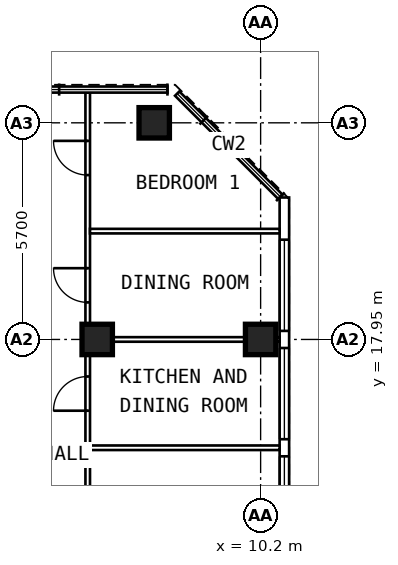
"""IFC4 building model, lengths in metres.
Left out: names, types, materials, properties, quantities, classifications, styles, units other than length and angle.
Written with IfcOpenShell. Run it as: python <this file> out.ifc"""

import sys

from ifc_helpers import new_model, si_unit, direction, frame, frame_2d, origin, origin_2d, place, context, subcontext, project, spatial, rectangle, extrude, element, fill, save


model = new_model("IFC4")
c1 = context("Model", 3, precision=1e-05, world=origin(), true_north=direction((0.0, 1.0)))
c2 = subcontext(c1, "Body", "Model", "MODEL_VIEW")
j1 = project(units=[si_unit("LENGTHUNIT", "METRE"), si_unit("PLANEANGLEUNIT", "RADIAN")], contexts=[c1])
p1 = place(None, origin())
s1 = spatial("IfcSite", under=j1, at=p1, CompositionType="ELEMENT")
p2 = place(p1, origin())
s2 = spatial("IfcBuilding", under=s1, at=p2, CompositionType="ELEMENT")
p3 = place(p2, frame((0.0, 0.0, 274.6)))
s3 = spatial("IfcBuildingStorey", under=s2, at=p3, CompositionType="ELEMENT", Elevation=274.6)
for number, where, z_axis, x_axis in (
    (1, (10.2, 17.95, 0.0), (0.0, 0.0, 1.0), (0.0, 1.0, 0.0)),
    (2, (7.4, 23.65, 0.0), (0.0, 0.0, 1.0), (0.0, 1.0, 0.0)),
    (3, (5.9, 17.95, 0.0), (0.0, 0.0, 1.0), (0.0, 1.0, 0.0)),
):
    element("IfcColumn", number, at=place(p3, frame(where, z_axis=z_axis, x_axis=x_axis)), inside=s3, PredefinedType="COLUMN", context=c2, shape_type="SweptSolid", body=[
        extrude(rectangle(XDim=0.8, YDim=0.8, at=origin_2d()), origin(), (0.0, 0.0, 1.0), 3.6),
    ])
p4 = place(p3, frame((10.825, 6.409, 0.0), z_axis=(0.0, 0.0, 1.0), x_axis=(0.0, 1.0, 0.0)))
e4 = element("IfcWall", 4, at=p4, inside=s3, PredefinedType="SOLIDWALL", context=c2, shape_type="SweptSolid", body=[
    extrude(rectangle(XDim=15.276, YDim=0.25, at=frame_2d((7.638, 0.0))), origin(), (0.0, 0.0, 1.0), 3.35),
])
p5 = place(p4, frame((0.366, 0.0, 0.6)))
e5 = element("IfcOpeningElement", 5, at=p5, cuts=e4, PredefinedType="OPENING", context=c2, shape_type="SweptSolid", body=[
    extrude(rectangle(XDim=2.4, YDim=2.0, at=frame_2d((1.2, 1.0))), frame((0.0, 0.137, 0.0), z_axis=(0.0, -1.0, 0.0), x_axis=(1.0, 0.0, 0.0)), (0.0, 0.0, 1.0), 0.274),
])
p6 = place(p4, frame((3.216, 0.0, 0.6)))
e6 = element("IfcOpeningElement", 6, at=p6, cuts=e4, PredefinedType="OPENING", context=c2, shape_type="SweptSolid", body=[
    extrude(rectangle(XDim=2.4, YDim=2.0, at=frame_2d((1.2, 1.0))), frame((0.0, 0.137, 0.0), z_axis=(0.0, -1.0, 0.0), x_axis=(1.0, 0.0, 0.0)), (0.0, 0.0, 1.0), 0.274),
])
p7 = place(p4, frame((6.066, 0.0, 0.6)))
e7 = element("IfcOpeningElement", 7, at=p7, cuts=e4, PredefinedType="OPENING", context=c2, shape_type="SweptSolid", body=[
    extrude(rectangle(XDim=2.4, YDim=2.0, at=frame_2d((1.2, 1.0))), frame((0.0, 0.137, 0.0), z_axis=(0.0, -1.0, 0.0), x_axis=(1.0, 0.0, 0.0)), (0.0, 0.0, 1.0), 0.274),
])
p8 = place(p4, frame((8.916, 0.0, 0.6)))
e8 = element("IfcOpeningElement", 8, at=p8, cuts=e4, PredefinedType="OPENING", context=c2, shape_type="SweptSolid", body=[
    extrude(rectangle(XDim=2.4, YDim=2.0, at=frame_2d((1.2, 1.0))), frame((0.0, 0.137, 0.0), z_axis=(0.0, -1.0, 0.0), x_axis=(1.0, 0.0, 0.0)), (0.0, 0.0, 1.0), 0.274),
])
p9 = place(p4, frame((11.766, 0.0, 0.6)))
e9 = element("IfcOpeningElement", 9, at=p9, cuts=e4, PredefinedType="OPENING", context=c2, shape_type="SweptSolid", body=[
    extrude(rectangle(XDim=2.4, YDim=2.0, at=frame_2d((1.2, 1.0))), frame((0.0, 0.137, 0.0), z_axis=(0.0, -1.0, 0.0), x_axis=(1.0, 0.0, 0.0)), (0.0, 0.0, 1.0), 0.274),
])
p10 = place(p3, frame((5.65, 9.6, 0.0), z_axis=(0.0, 0.0, 1.0), x_axis=(0.0, 1.0, 0.0)))
e10 = element("IfcWall", 10, at=p10, inside=s3, PredefinedType="PARTITIONING", context=c2, shape_type="SweptSolid", body=[
    extrude(rectangle(XDim=14.845, YDim=0.12, at=frame_2d((7.422, 0.0))), origin(), (0.0, 0.0, 1.0), 3.35),
])
p11 = place(p10, frame((3.2, 0.0, 0.0)))
e11 = element("IfcOpeningElement", 11, at=p11, cuts=e10, PredefinedType="OPENING", context=c2, shape_type="SweptSolid", body=[
    extrude(rectangle(XDim=0.9, YDim=2.1, at=frame_2d((0.45, 1.05))), frame((0.0, 0.072, 0.0), z_axis=(0.0, -1.0, 0.0), x_axis=(1.0, 0.0, 0.0)), (0.0, 0.0, 1.0), 0.144),
])
p12 = place(p10, frame((6.475, 0.0, 0.0)))
e12 = element("IfcOpeningElement", 12, at=p12, cuts=e10, PredefinedType="OPENING", context=c2, shape_type="SweptSolid", body=[
    extrude(rectangle(XDim=0.9, YDim=2.1, at=frame_2d((0.45, 1.05))), frame((0.0, 0.072, 0.0), z_axis=(0.0, -1.0, 0.0), x_axis=(1.0, 0.0, 0.0)), (0.0, 0.0, 1.0), 0.144),
])
p13 = place(p10, frame((9.325, 0.0, 0.0)))
e13 = element("IfcOpeningElement", 13, at=p13, cuts=e10, PredefinedType="OPENING", context=c2, shape_type="SweptSolid", body=[
    extrude(rectangle(XDim=0.9, YDim=2.1, at=frame_2d((0.45, 1.05))), frame((0.0, 0.072, 0.0), z_axis=(0.0, -1.0, 0.0), x_axis=(1.0, 0.0, 0.0)), (0.0, 0.0, 1.0), 0.144),
])
p14 = place(p10, frame((12.675, 0.0, 0.0)))
e14 = element("IfcOpeningElement", 14, at=p14, cuts=e10, PredefinedType="OPENING", context=c2, shape_type="SweptSolid", body=[
    extrude(rectangle(XDim=0.9, YDim=2.1, at=frame_2d((0.45, 1.05))), frame((0.0, 0.072, 0.0), z_axis=(0.0, -1.0, 0.0), x_axis=(1.0, 0.0, 0.0)), (0.0, 0.0, 1.0), 0.144),
])
p15 = place(p3, frame((5.71, 15.1, 0.0), z_axis=(0.0, 0.0, 1.0), x_axis=(1.0, 0.0, 0.0)))
e15 = element("IfcWall", 15, at=p15, inside=s3, PredefinedType="PARTITIONING", context=c2, shape_type="SweptSolid", body=[
    extrude(rectangle(XDim=4.99, YDim=0.12, at=frame_2d((2.495, 0.0))), origin(), (0.0, 0.0, 1.0), 3.35),
])
p16 = place(p3, frame((5.71, 17.95, 0.0), z_axis=(0.0, 0.0, 1.0), x_axis=(1.0, 0.0, 0.0)))
e16 = element("IfcWall", 16, at=p16, inside=s3, PredefinedType="PARTITIONING", context=c2, shape_type="SweptSolid", body=[
    extrude(rectangle(XDim=4.99, YDim=0.12, at=frame_2d((2.495, 0.0))), origin(), (0.0, 0.0, 1.0), 2.45),
])
p17 = place(p3, frame((5.71, 20.8, 0.0), z_axis=(0.0, 0.0, 1.0), x_axis=(1.0, 0.0, 0.0)))
e17 = element("IfcWall", 17, at=p17, inside=s3, PredefinedType="PARTITIONING", context=c2, shape_type="SweptSolid", body=[
    extrude(rectangle(XDim=4.99, YDim=0.12, at=frame_2d((2.495, 0.0))), origin(), (0.0, 0.0, 1.0), 3.35),
])
p18 = place(p7, origin())
e18 = element("IfcWindow", 18, at=p18, inside=s3, PartitioningType="SINGLE_PANEL", PredefinedType="WINDOW", context=c2, shape_type="SweptSolid", body=[
    extrude(rectangle(XDim=2.4, YDim=2.0, at=frame_2d((1.2, 1.0))), frame((0.0, 0.03, 0.0), z_axis=(0.0, -1.0, 0.0), x_axis=(1.0, 0.0, 0.0)), (0.0, 0.0, 1.0), 0.06),
])
fill(e7, e18)
p19 = place(p8, origin())
e19 = element("IfcWindow", 19, at=p19, inside=s3, PartitioningType="SINGLE_PANEL", PredefinedType="WINDOW", context=c2, shape_type="SweptSolid", body=[
    extrude(rectangle(XDim=2.4, YDim=2.0, at=frame_2d((1.2, 1.0))), frame((0.0, 0.03, 0.0), z_axis=(0.0, -1.0, 0.0), x_axis=(1.0, 0.0, 0.0)), (0.0, 0.0, 1.0), 0.06),
])
fill(e8, e19)
p20 = place(p9, origin())
e20 = element("IfcWindow", 20, at=p20, inside=s3, PartitioningType="SINGLE_PANEL", PredefinedType="WINDOW", context=c2, shape_type="SweptSolid", body=[
    extrude(rectangle(XDim=2.4, YDim=2.0, at=frame_2d((1.2, 1.0))), frame((0.0, 0.03, 0.0), z_axis=(0.0, -1.0, 0.0), x_axis=(1.0, 0.0, 0.0)), (0.0, 0.0, 1.0), 0.06),
])
fill(e9, e20)
p21 = place(p12, origin())
e21 = element("IfcDoor", 21, at=p21, inside=s3, OperationType="SINGLE_SWING_LEFT", PredefinedType="DOOR", context=c2, shape_type="SweptSolid", body=[
    extrude(rectangle(XDim=0.9, YDim=2.1, at=frame_2d((0.45, 1.05))), frame((0.0, 0.025, 0.0), z_axis=(0.0, -1.0, 0.0), x_axis=(1.0, 0.0, 0.0)), (0.0, 0.0, 1.0), 0.05),
])
fill(e12, e21)
p22 = place(p13, origin())
e22 = element("IfcDoor", 22, at=p22, inside=s3, OperationType="SINGLE_SWING_RIGHT", PredefinedType="DOOR", context=c2, shape_type="SweptSolid", body=[
    extrude(rectangle(XDim=0.9, YDim=2.1, at=frame_2d((0.45, 1.05))), frame((0.0, 0.025, 0.0), z_axis=(0.0, -1.0, 0.0), x_axis=(1.0, 0.0, 0.0)), (0.0, 0.0, 1.0), 0.05),
])
fill(e13, e22)
p23 = place(p14, origin())
e23 = element("IfcDoor", 23, at=p23, inside=s3, OperationType="SINGLE_SWING_RIGHT", PredefinedType="DOOR", context=c2, shape_type="SweptSolid", body=[
    extrude(rectangle(XDim=0.9, YDim=2.1, at=frame_2d((0.45, 1.05))), frame((0.0, 0.025, 0.0), z_axis=(0.0, -1.0, 0.0), x_axis=(1.0, 0.0, 0.0)), (0.0, 0.0, 1.0), 0.05),
])
fill(e14, e23)
save(model, sys.argv[1])
